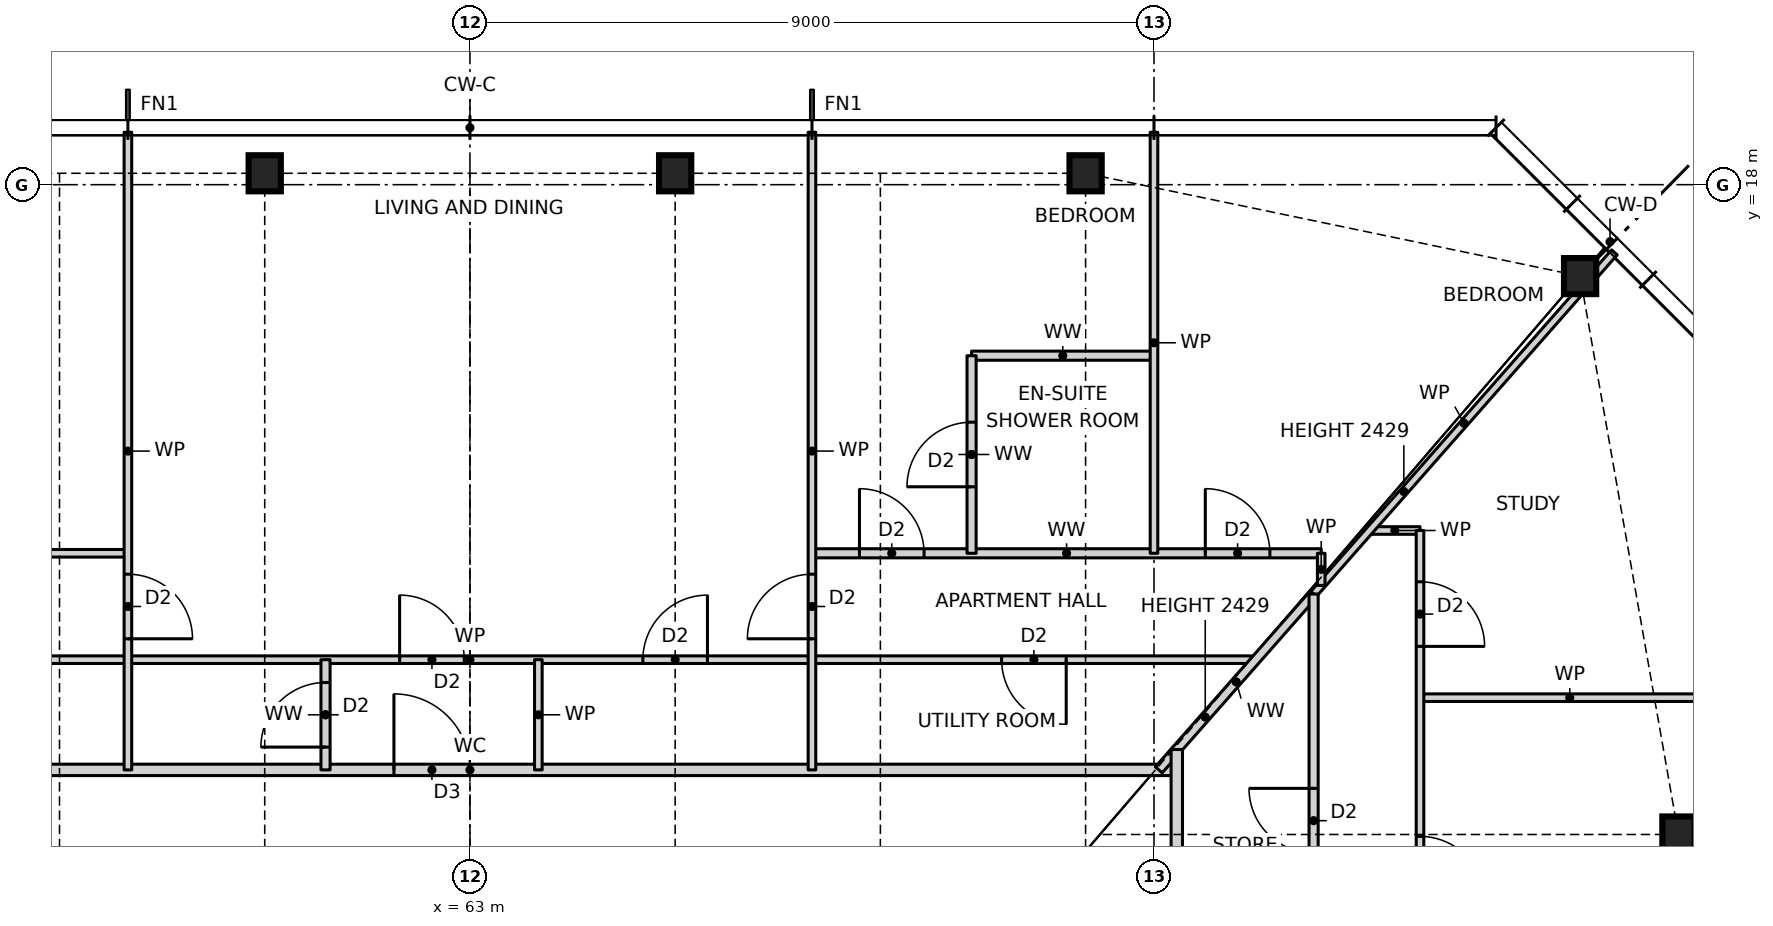
"""IFC4 building model, lengths in metres.
Left out: names, types, materials, properties, quantities, classifications, styles, units other than length and angle.
Written with IfcOpenShell. Run it as: python <this file> out.ifc"""

import sys

from ifc_helpers import new_model, si_unit, direction, frame, frame_2d, origin, origin_2d, place, context, subcontext, project, spatial, rectangle, i_section, extrude, element, fill, save


model = new_model("IFC4")
c1 = context("Model", 3, precision=1e-05, world=origin(), true_north=direction((0.0, 1.0)))
c2 = subcontext(c1, "Body", "Model", "MODEL_VIEW")
j1 = project(units=[si_unit("LENGTHUNIT", "METRE"), si_unit("PLANEANGLEUNIT", "RADIAN")], contexts=[c1])
p1 = place(None, origin())
s1 = spatial("IfcSite", under=j1, at=p1, CompositionType="ELEMENT")
p2 = place(p1, origin())
s2 = spatial("IfcBuilding", under=s1, at=p2, CompositionType="ELEMENT")
p3 = place(p2, frame((0.0, 0.0, 32.5)))
s3 = spatial("IfcBuildingStorey", under=s2, at=p3, CompositionType="ELEMENT", Elevation=32.5)
for number, where, z_axis, x_axis in (
    (1, (78.9, 9.45, 0.0), (0.0, 0.0, 1.0), (1.0, 0.0, 0.0)),
    (2, (77.606, 16.797, 0.0), (0.0, 0.0, 1.0), (1.0, 0.0, 0.0)),
    (3, (71.1, 18.15, 0.0), (0.0, 0.0, 1.0), (1.0, 0.0, 0.0)),
    (4, (65.7, 18.15, 0.0), (0.0, 0.0, 1.0), (1.0, 0.0, 0.0)),
    (5, (60.3, 18.15, 0.0), (0.0, 0.0, 1.0), (1.0, 0.0, 0.0)),
):
    element("IfcColumn", number, at=place(p3, frame(where, z_axis=z_axis, x_axis=x_axis)), inside=s3, PredefinedType="COLUMN", context=c2, shape_type="SweptSolid", body=[
        extrude(i_section(OverallWidth=0.424, OverallDepth=0.475, WebThickness=0.048, FlangeThickness=0.077, at=origin_2d()), origin(), (0.0, 0.0, 1.0), 3.5),
    ])
p4 = place(p3, frame((53.7, 10.3, 0.0), z_axis=(0.0, 0.0, 1.0), x_axis=(1.0, 0.0, 0.0)))
e6 = element("IfcWall", 6, at=p4, inside=s3, PredefinedType="PARTITIONING", context=c2, shape_type="SweptSolid", body=[
    extrude(rectangle(XDim=18.6, YDim=0.15, at=frame_2d((9.3, 0.0))), origin(), (0.0, 0.0, 1.0), 3.27),
])
p5 = place(p4, frame((8.3, 0.0, 0.0)))
e7 = element("IfcOpeningElement", 7, at=p5, cuts=e6, PredefinedType="OPENING", context=c2, shape_type="SweptSolid", body=[
    extrude(rectangle(XDim=1.0, YDim=2.1, at=frame_2d((0.5, 1.05))), frame((0.0, 0.085, 0.0), z_axis=(0.0, -1.0, 0.0), x_axis=(1.0, 0.0, 0.0)), (0.0, 0.0, 1.0), 0.17),
])
p6 = place(p3, frame((75.5, 11.25, 0.0), z_axis=(0.0, 0.0, 1.0), x_axis=(1.0, 0.0, 0.0)))
e8 = element("IfcWall", 8, at=p6, inside=s3, PredefinedType="PARTITIONING", context=c2, shape_type="SweptSolid", body=[
    extrude(rectangle(XDim=3.94, YDim=0.1, at=frame_2d((1.97, 0.0))), origin(), (0.0, 0.0, 1.0), 3.27),
])
p7 = place(p3, frame((52.66, 11.75, 0.0), z_axis=(0.0, 0.0, 1.0), x_axis=(1.0, 0.0, 0.0)))
e9 = element("IfcWall", 9, at=p7, inside=s3, PredefinedType="PARTITIONING", context=c2, shape_type="SweptSolid", body=[
    extrude(rectangle(XDim=20.68, YDim=0.1, at=frame_2d((10.34, 0.0))), origin(), (0.0, 0.0, 1.0), 3.27),
])
p8 = place(p7, frame((12.615, 0.0, 0.0)))
e10 = element("IfcOpeningElement", 10, at=p8, cuts=e9, PredefinedType="OPENING", context=c2, shape_type="SweptSolid", body=[
    extrude(rectangle(XDim=0.85, YDim=2.1, at=frame_2d((0.425, 1.05))), frame((0.0, 0.06, 0.0), z_axis=(0.0, -1.0, 0.0), x_axis=(1.0, 0.0, 0.0)), (0.0, 0.0, 1.0), 0.12),
])
p9 = place(p7, frame((9.415, 0.0, 0.0)))
e11 = element("IfcOpeningElement", 11, at=p9, cuts=e9, PredefinedType="OPENING", context=c2, shape_type="SweptSolid", body=[
    extrude(rectangle(XDim=0.85, YDim=2.1, at=frame_2d((0.425, 1.05))), frame((0.0, 0.06, 0.0), z_axis=(0.0, -1.0, 0.0), x_axis=(1.0, 0.0, 0.0)), (0.0, 0.0, 1.0), 0.12),
])
p10 = place(p7, frame((17.335, 0.0, 0.0)))
e12 = element("IfcOpeningElement", 12, at=p10, cuts=e9, PredefinedType="OPENING", context=c2, shape_type="SweptSolid", body=[
    extrude(rectangle(XDim=0.85, YDim=2.1, at=frame_2d((0.425, 1.05))), frame((0.0, 0.06, 0.0), z_axis=(0.0, -1.0, 0.0), x_axis=(1.0, 0.0, 0.0)), (0.0, 0.0, 1.0), 0.12),
])
p11 = place(p7, frame((2.495, 0.0, 0.0)))
e13 = element("IfcOpeningElement", 13, at=p11, cuts=e9, PredefinedType="OPENING", context=c2, shape_type="SweptSolid", body=[
    extrude(rectangle(XDim=0.85, YDim=2.1, at=frame_2d((0.425, 1.05))), frame((0.0, 0.06, 0.0), z_axis=(0.0, -1.0, 0.0), x_axis=(1.0, 0.0, 0.0)), (0.0, 0.0, 1.0), 0.12),
])
p12 = place(p3, frame((51.8, 13.15, 0.0), z_axis=(0.0, 0.0, 1.0), x_axis=(1.0, 0.0, 0.0)))
e14 = element("IfcWall", 14, at=p12, inside=s3, PredefinedType="PARTITIONING", context=c2, shape_type="SweptSolid", body=[
    extrude(rectangle(XDim=6.7, YDim=0.1, at=frame_2d((3.35, 0.0))), origin(), (0.0, 0.0, 1.0), 3.27),
])
p13 = place(p12, frame((4.025, 0.0, 0.0)))
e15 = element("IfcOpeningElement", 15, at=p13, cuts=e14, PredefinedType="OPENING", context=c2, shape_type="SweptSolid", body=[
    extrude(rectangle(XDim=0.85, YDim=2.1, at=frame_2d((0.425, 1.05))), frame((0.0, 0.06, 0.0), z_axis=(0.0, -1.0, 0.0), x_axis=(1.0, 0.0, 0.0)), (0.0, 0.0, 1.0), 0.12),
])
p14 = place(p12, frame((0.675, 0.0, 0.0)))
e16 = element("IfcOpeningElement", 16, at=p14, cuts=e14, PredefinedType="OPENING", context=c2, shape_type="SweptSolid", body=[
    extrude(rectangle(XDim=0.85, YDim=2.1, at=frame_2d((0.425, 1.05))), frame((0.0, 0.06, 0.0), z_axis=(0.0, -1.0, 0.0), x_axis=(1.0, 0.0, 0.0)), (0.0, 0.0, 1.0), 0.12),
])
p15 = place(p3, frame((67.5, 13.15, 0.0), z_axis=(0.0, 0.0, 1.0), x_axis=(1.0, 0.0, 0.0)))
e17 = element("IfcWall", 17, at=p15, inside=s3, PredefinedType="PARTITIONING", context=c2, shape_type="SweptSolid", body=[
    extrude(rectangle(XDim=6.7, YDim=0.12, at=frame_2d((3.35, 0.0))), origin(), (0.0, 0.0, 1.0), 3.27),
])
p16 = place(p15, frame((0.625, 0.0, 0.0)))
e18 = element("IfcOpeningElement", 18, at=p16, cuts=e17, PredefinedType="OPENING", context=c2, shape_type="SweptSolid", body=[
    extrude(rectangle(XDim=0.85, YDim=2.1, at=frame_2d((0.425, 1.05))), frame((0.0, 0.07, 0.0), z_axis=(0.0, -1.0, 0.0), x_axis=(1.0, 0.0, 0.0)), (0.0, 0.0, 1.0), 0.14),
])
p17 = place(p15, frame((5.175, 0.0, 0.0)))
e19 = element("IfcOpeningElement", 19, at=p17, cuts=e17, PredefinedType="OPENING", context=c2, shape_type="SweptSolid", body=[
    extrude(rectangle(XDim=0.85, YDim=2.1, at=frame_2d((0.425, 1.05))), frame((0.0, 0.07, 0.0), z_axis=(0.0, -1.0, 0.0), x_axis=(1.0, 0.0, 0.0)), (0.0, 0.0, 1.0), 0.14),
])
p18 = place(p3, frame((74.836, 13.45, 0.0), z_axis=(0.0, 0.0, 1.0), x_axis=(1.0, 0.0, 0.0)))
e20 = element("IfcWall", 20, at=p18, inside=s3, PredefinedType="PARTITIONING", context=c2, shape_type="SweptSolid", body=[
    extrude(rectangle(XDim=0.664, YDim=0.1, at=frame_2d((0.332, 0.0))), origin(), (0.0, 0.0, 1.0), 3.27),
])
p19 = place(p3, frame((69.6, 15.75, 0.0), z_axis=(0.0, 0.0, 1.0), x_axis=(1.0, 0.0, 0.0)))
e21 = element("IfcWall", 21, at=p19, inside=s3, PredefinedType="PARTITIONING", context=c2, shape_type="SweptSolid", body=[
    extrude(rectangle(XDim=2.4, YDim=0.12, at=frame_2d((1.2, 0.0))), origin(), (0.0, 0.0, 1.0), 3.27),
])
p20 = place(p3, frame((74.1, 12.614, 0.0), z_axis=(0.0, 0.0, 1.0), x_axis=(0.660755619739, 0.750601099775, 0.0)))
e22 = element("IfcWall", 22, at=p20, inside=s3, PredefinedType="PARTITIONING", context=c2, shape_type="SweptSolid", body=[
    extrude(rectangle(XDim=5.989, YDim=0.1, at=frame_2d((2.995, 0.0))), origin(), (0.0, 0.0, 1.0), 2.429),
])
p21 = place(p3, frame((72.063, 10.301, 0.0), z_axis=(0.0, 0.0, 1.0), x_axis=(0.660761820138, 0.750595641506, 0.0)))
e23 = element("IfcWall", 23, at=p21, inside=s3, PredefinedType="PARTITIONING", context=c2, shape_type="SweptSolid", body=[
    extrude(rectangle(XDim=3.082, YDim=0.12, at=frame_2d((1.541, 0.0))), origin(), (0.0, 0.0, 1.0), 2.429),
])
p22 = place(p3, frame((75.5, 2.25, 0.0), z_axis=(0.0, 0.0, 1.0), x_axis=(0.0, 1.0, 0.0)))
e24 = element("IfcWall", 24, at=p22, inside=s3, PredefinedType="PARTITIONING", context=c2, shape_type="SweptSolid", body=[
    extrude(rectangle(XDim=11.2, YDim=0.1, at=frame_2d((5.6, 0.0))), origin(), (0.0, 0.0, 1.0), 3.27),
])
p23 = place(p22, frame((1.825, 0.0, 0.0)))
e25 = element("IfcOpeningElement", 25, at=p23, cuts=e24, PredefinedType="OPENING", context=c2, shape_type="SweptSolid", body=[
    extrude(rectangle(XDim=0.85, YDim=2.1, at=frame_2d((0.425, 1.05))), frame((0.0, 0.06, 0.0), z_axis=(0.0, -1.0, 0.0), x_axis=(1.0, 0.0, 0.0)), (0.0, 0.0, 1.0), 0.12),
])
p24 = place(p22, frame((6.325, 0.0, 0.0)))
e26 = element("IfcOpeningElement", 26, at=p24, cuts=e24, PredefinedType="OPENING", context=c2, shape_type="SweptSolid", body=[
    extrude(rectangle(XDim=0.85, YDim=2.1, at=frame_2d((0.425, 1.05))), frame((0.0, 0.06, 0.0), z_axis=(0.0, -1.0, 0.0), x_axis=(1.0, 0.0, 0.0)), (0.0, 0.0, 1.0), 0.12),
])
p25 = place(p22, frame((9.675, 0.0, 0.0)))
e27 = element("IfcOpeningElement", 27, at=p25, cuts=e24, PredefinedType="OPENING", context=c2, shape_type="SweptSolid", body=[
    extrude(rectangle(XDim=0.85, YDim=2.1, at=frame_2d((0.425, 1.05))), frame((0.0, 0.06, 0.0), z_axis=(0.0, -1.0, 0.0), x_axis=(1.0, 0.0, 0.0)), (0.0, 0.0, 1.0), 0.12),
])
p26 = place(p3, frame((74.2, 12.727, 0.0), z_axis=(0.0, 0.0, 1.0), x_axis=(0.0, 1.0, 0.0)))
e28 = element("IfcWall", 28, at=p26, inside=s3, PredefinedType="PARTITIONING", context=c2, shape_type="SweptSolid", body=[
    extrude(rectangle(XDim=0.423, YDim=0.1, at=frame_2d((0.211, 0.0))), origin(), (0.0, 0.0, 1.0), 3.27),
])
p27 = place(p3, frame((74.1, -12.614, 0.0), z_axis=(0.0, 0.0, 1.0), x_axis=(0.0, 1.0, 0.0)))
e29 = element("IfcWall", 29, at=p27, inside=s3, PredefinedType="PARTITIONING", context=c2, shape_type="SweptSolid", body=[
    extrude(rectangle(XDim=25.228, YDim=0.12, at=frame_2d((12.614, 0.0))), origin(), (0.0, 0.0, 1.0), 3.27),
])
p28 = place(p27, frame((7.239, 0.0, 0.0)))
e30 = element("IfcOpeningElement", 30, at=p28, cuts=e29, PredefinedType="OPENING", context=c2, shape_type="SweptSolid", body=[
    extrude(rectangle(XDim=0.85, YDim=2.1, at=frame_2d((0.425, 1.05))), frame((0.0, 0.07, 0.0), z_axis=(0.0, -1.0, 0.0), x_axis=(1.0, 0.0, 0.0)), (0.0, 0.0, 1.0), 0.14),
])
p29 = place(p27, frame((10.439, 0.0, 0.0)))
e31 = element("IfcOpeningElement", 31, at=p29, cuts=e29, PredefinedType="OPENING", context=c2, shape_type="SweptSolid", body=[
    extrude(rectangle(XDim=0.85, YDim=2.1, at=frame_2d((0.425, 1.05))), frame((0.0, 0.07, 0.0), z_axis=(0.0, -1.0, 0.0), x_axis=(1.0, 0.0, 0.0)), (0.0, 0.0, 1.0), 0.14),
])
p30 = place(p27, frame((2.507, 0.0, 0.0)))
e32 = element("IfcOpeningElement", 32, at=p30, cuts=e29, PredefinedType="OPENING", context=c2, shape_type="SweptSolid", body=[
    extrude(rectangle(XDim=0.85, YDim=2.1, at=frame_2d((0.425, 1.05))), frame((0.0, 0.07, 0.0), z_axis=(0.0, -1.0, 0.0), x_axis=(1.0, 0.0, 0.0)), (0.0, 0.0, 1.0), 0.14),
])
p31 = place(p27, frame((16.639, 0.0, 0.0)))
e33 = element("IfcOpeningElement", 33, at=p31, cuts=e29, PredefinedType="OPENING", context=c2, shape_type="SweptSolid", body=[
    extrude(rectangle(XDim=0.85, YDim=2.1, at=frame_2d((0.425, 1.05))), frame((0.0, 0.07, 0.0), z_axis=(0.0, -1.0, 0.0), x_axis=(1.0, 0.0, 0.0)), (0.0, 0.0, 1.0), 0.14),
])
p32 = place(p27, frame((21.821, 0.0, 0.0)))
e34 = element("IfcOpeningElement", 34, at=p32, cuts=e29, PredefinedType="OPENING", context=c2, shape_type="SweptSolid", body=[
    extrude(rectangle(XDim=0.85, YDim=2.1, at=frame_2d((0.425, 1.05))), frame((0.0, 0.07, 0.0), z_axis=(0.0, -1.0, 0.0), x_axis=(1.0, 0.0, 0.0)), (0.0, 0.0, 1.0), 0.14),
])
p33 = place(p3, frame((72.3, -10.568, 0.0), z_axis=(0.0, 0.0, 1.0), x_axis=(0.0, 1.0, 0.0)))
e35 = element("IfcWall", 35, at=p33, inside=s3, PredefinedType="PARTITIONING", context=c2, shape_type="SweptSolid", body=[
    extrude(rectangle(XDim=21.136, YDim=0.15, at=frame_2d((10.568, 0.0))), origin(), (0.0, 0.0, 1.0), 3.27),
])
p34 = place(p33, frame((8.318, 0.0, 0.0)))
e36 = element("IfcOpeningElement", 36, at=p34, cuts=e35, PredefinedType="OPENING", context=c2, shape_type="SweptSolid", body=[
    extrude(rectangle(XDim=1.0, YDim=2.1, at=frame_2d((0.5, 1.05))), frame((0.0, 0.085, 0.0), z_axis=(0.0, -1.0, 0.0), x_axis=(1.0, 0.0, 0.0)), (0.0, 0.0, 1.0), 0.17),
])
p35 = place(p3, frame((72.0, 13.15, 0.0), z_axis=(0.0, 0.0, 1.0), x_axis=(0.0, 1.0, 0.0)))
e37 = element("IfcWall", 37, at=p35, inside=s3, PredefinedType="PARTITIONING", context=c2, shape_type="SweptSolid", body=[
    extrude(rectangle(XDim=5.54, YDim=0.1, at=frame_2d((2.77, 0.0))), origin(), (0.0, 0.0, 1.0), 3.27),
])
p36 = place(p3, frame((69.6, 13.15, 0.0), z_axis=(0.0, 0.0, 1.0), x_axis=(0.0, 1.0, 0.0)))
e38 = element("IfcWall", 38, at=p36, inside=s3, PredefinedType="PARTITIONING", context=c2, shape_type="SweptSolid", body=[
    extrude(rectangle(XDim=2.6, YDim=0.12, at=frame_2d((1.3, 0.0))), origin(), (0.0, 0.0, 1.0), 3.27),
])
p37 = place(p36, frame((0.875, 0.0, 0.0)))
e39 = element("IfcOpeningElement", 39, at=p37, cuts=e38, PredefinedType="OPENING", context=c2, shape_type="SweptSolid", body=[
    extrude(rectangle(XDim=0.85, YDim=2.1, at=frame_2d((0.425, 1.05))), frame((0.0, 0.07, 0.0), z_axis=(0.0, -1.0, 0.0), x_axis=(1.0, 0.0, 0.0)), (0.0, 0.0, 1.0), 0.14),
])
p38 = place(p3, frame((67.5, 10.3, 0.0), z_axis=(0.0, 0.0, 1.0), x_axis=(0.0, 1.0, 0.0)))
e40 = element("IfcWall", 40, at=p38, inside=s3, PredefinedType="PARTITIONING", context=c2, shape_type="SweptSolid", body=[
    extrude(rectangle(XDim=8.39, YDim=0.1, at=frame_2d((4.195, 0.0))), origin(), (0.0, 0.0, 1.0), 3.27),
])
p39 = place(p38, frame((1.725, 0.0, 0.0)))
e41 = element("IfcOpeningElement", 41, at=p39, cuts=e40, PredefinedType="OPENING", context=c2, shape_type="SweptSolid", body=[
    extrude(rectangle(XDim=0.85, YDim=2.1, at=frame_2d((0.425, 1.05))), frame((0.0, 0.06, 0.0), z_axis=(0.0, -1.0, 0.0), x_axis=(1.0, 0.0, 0.0)), (0.0, 0.0, 1.0), 0.12),
])
p40 = place(p3, frame((63.9, 10.3, 0.0), z_axis=(0.0, 0.0, 1.0), x_axis=(0.0, 1.0, 0.0)))
e42 = element("IfcWall", 42, at=p40, inside=s3, PredefinedType="PARTITIONING", context=c2, shape_type="SweptSolid", body=[
    extrude(rectangle(XDim=1.45, YDim=0.1, at=frame_2d((0.725, 0.0))), origin(), (0.0, 0.0, 1.0), 3.27),
])
p41 = place(p3, frame((61.1, 10.3, 0.0), z_axis=(0.0, 0.0, 1.0), x_axis=(0.0, 1.0, 0.0)))
e43 = element("IfcWall", 43, at=p41, inside=s3, PredefinedType="PARTITIONING", context=c2, shape_type="SweptSolid", body=[
    extrude(rectangle(XDim=1.45, YDim=0.12, at=frame_2d((0.725, 0.0))), origin(), (0.0, 0.0, 1.0), 3.27),
])
p42 = place(p41, frame((0.3, 0.0, 0.0)))
e44 = element("IfcOpeningElement", 44, at=p42, cuts=e43, PredefinedType="OPENING", context=c2, shape_type="SweptSolid", body=[
    extrude(rectangle(XDim=0.85, YDim=2.1, at=frame_2d((0.425, 1.05))), frame((0.0, 0.07, 0.0), z_axis=(0.0, -1.0, 0.0), x_axis=(1.0, 0.0, 0.0)), (0.0, 0.0, 1.0), 0.14),
])
p43 = place(p3, frame((58.5, 10.3, 0.0), z_axis=(0.0, 0.0, 1.0), x_axis=(0.0, 1.0, 0.0)))
e45 = element("IfcWall", 45, at=p43, inside=s3, PredefinedType="PARTITIONING", context=c2, shape_type="SweptSolid", body=[
    extrude(rectangle(XDim=8.39, YDim=0.1, at=frame_2d((4.195, 0.0))), origin(), (0.0, 0.0, 1.0), 3.27),
])
p44 = place(p43, frame((1.725, 0.0, 0.0)))
e46 = element("IfcOpeningElement", 46, at=p44, cuts=e45, PredefinedType="OPENING", context=c2, shape_type="SweptSolid", body=[
    extrude(rectangle(XDim=0.85, YDim=2.1, at=frame_2d((0.425, 1.05))), frame((0.0, 0.06, 0.0), z_axis=(0.0, -1.0, 0.0), x_axis=(1.0, 0.0, 0.0)), (0.0, 0.0, 1.0), 0.12),
])
p45 = place(p24, frame((0.85, 0.0, 0.0), z_axis=(0.0, 0.0, 1.0), x_axis=(-1.0, 0.0, 0.0)))
e47 = element("IfcDoor", 47, at=p45, inside=s3, OperationType="SINGLE_SWING_RIGHT", PredefinedType="DOOR", context=c2, shape_type="SweptSolid", body=[
    extrude(rectangle(XDim=0.85, YDim=2.1, at=frame_2d((0.425, 1.05))), frame((0.0, 0.025, 0.0), z_axis=(0.0, -1.0, 0.0), x_axis=(1.0, 0.0, 0.0)), (0.0, 0.0, 1.0), 0.05),
])
fill(e26, e47)
p46 = place(p25, frame((0.85, 0.0, 0.0), z_axis=(0.0, 0.0, 1.0), x_axis=(-1.0, 0.0, 0.0)))
e48 = element("IfcDoor", 48, at=p46, inside=s3, OperationType="SINGLE_SWING_RIGHT", PredefinedType="DOOR", context=c2, shape_type="SweptSolid", body=[
    extrude(rectangle(XDim=0.85, YDim=2.1, at=frame_2d((0.425, 1.05))), frame((0.0, 0.025, 0.0), z_axis=(0.0, -1.0, 0.0), x_axis=(1.0, 0.0, 0.0)), (0.0, 0.0, 1.0), 0.05),
])
fill(e27, e48)
p47 = place(p32, origin())
e49 = element("IfcDoor", 49, at=p47, inside=s3, OperationType="SINGLE_SWING_RIGHT", PredefinedType="DOOR", context=c2, shape_type="SweptSolid", body=[
    extrude(rectangle(XDim=0.85, YDim=2.1, at=frame_2d((0.425, 1.05))), frame((0.0, 0.025, 0.0), z_axis=(0.0, -1.0, 0.0), x_axis=(1.0, 0.0, 0.0)), (0.0, 0.0, 1.0), 0.05),
])
fill(e34, e49)
p48 = place(p8, origin())
e50 = element("IfcDoor", 50, at=p48, inside=s3, OperationType="SINGLE_SWING_RIGHT", PredefinedType="DOOR", context=c2, shape_type="SweptSolid", body=[
    extrude(rectangle(XDim=0.85, YDim=2.1, at=frame_2d((0.425, 1.05))), frame((0.0, 0.025, 0.0), z_axis=(0.0, -1.0, 0.0), x_axis=(1.0, 0.0, 0.0)), (0.0, 0.0, 1.0), 0.05),
])
fill(e10, e50)
p49 = place(p5, origin())
e51 = element("IfcDoor", 51, at=p49, inside=s3, OperationType="SINGLE_SWING_LEFT", PredefinedType="DOOR", context=c2, shape_type="SweptSolid", body=[
    extrude(rectangle(XDim=1.0, YDim=2.1, at=frame_2d((0.5, 1.05))), frame((0.0, 0.025, 0.0), z_axis=(0.0, -1.0, 0.0), x_axis=(1.0, 0.0, 0.0)), (0.0, 0.0, 1.0), 0.05),
])
fill(e7, e51)
p50 = place(p9, origin())
e52 = element("IfcDoor", 52, at=p50, inside=s3, OperationType="SINGLE_SWING_LEFT", PredefinedType="DOOR", context=c2, shape_type="SweptSolid", body=[
    extrude(rectangle(XDim=0.85, YDim=2.1, at=frame_2d((0.425, 1.05))), frame((0.0, 0.025, 0.0), z_axis=(0.0, -1.0, 0.0), x_axis=(1.0, 0.0, 0.0)), (0.0, 0.0, 1.0), 0.05),
])
fill(e11, e52)
p51 = place(p42, origin())
e53 = element("IfcDoor", 53, at=p51, inside=s3, OperationType="SINGLE_SWING_LEFT", PredefinedType="DOOR", context=c2, shape_type="SweptSolid", body=[
    extrude(rectangle(XDim=0.85, YDim=2.1, at=frame_2d((0.425, 1.05))), frame((0.0, 0.025, 0.0), z_axis=(0.0, -1.0, 0.0), x_axis=(1.0, 0.0, 0.0)), (0.0, 0.0, 1.0), 0.05),
])
fill(e44, e53)
p52 = place(p39, origin())
e54 = element("IfcDoor", 54, at=p52, inside=s3, OperationType="SINGLE_SWING_LEFT", PredefinedType="DOOR", context=c2, shape_type="SweptSolid", body=[
    extrude(rectangle(XDim=0.85, YDim=2.1, at=frame_2d((0.425, 1.05))), frame((0.0, 0.025, 0.0), z_axis=(0.0, -1.0, 0.0), x_axis=(1.0, 0.0, 0.0)), (0.0, 0.0, 1.0), 0.05),
])
fill(e41, e54)
p53 = place(p37, origin())
e55 = element("IfcDoor", 55, at=p53, inside=s3, OperationType="SINGLE_SWING_LEFT", PredefinedType="DOOR", context=c2, shape_type="SweptSolid", body=[
    extrude(rectangle(XDim=0.85, YDim=2.1, at=frame_2d((0.425, 1.05))), frame((0.0, 0.025, 0.0), z_axis=(0.0, -1.0, 0.0), x_axis=(1.0, 0.0, 0.0)), (0.0, 0.0, 1.0), 0.05),
])
fill(e39, e55)
p54 = place(p16, origin())
e56 = element("IfcDoor", 56, at=p54, inside=s3, OperationType="SINGLE_SWING_LEFT", PredefinedType="DOOR", context=c2, shape_type="SweptSolid", body=[
    extrude(rectangle(XDim=0.85, YDim=2.1, at=frame_2d((0.425, 1.05))), frame((0.0, 0.025, 0.0), z_axis=(0.0, -1.0, 0.0), x_axis=(1.0, 0.0, 0.0)), (0.0, 0.0, 1.0), 0.05),
])
fill(e18, e56)
p55 = place(p17, origin())
e57 = element("IfcDoor", 57, at=p55, inside=s3, OperationType="SINGLE_SWING_LEFT", PredefinedType="DOOR", context=c2, shape_type="SweptSolid", body=[
    extrude(rectangle(XDim=0.85, YDim=2.1, at=frame_2d((0.425, 1.05))), frame((0.0, 0.025, 0.0), z_axis=(0.0, -1.0, 0.0), x_axis=(1.0, 0.0, 0.0)), (0.0, 0.0, 1.0), 0.05),
])
fill(e19, e57)
p56 = place(p10, frame((0.85, 0.0, 0.0), z_axis=(0.0, 0.0, 1.0), x_axis=(-1.0, 0.0, 0.0)))
e58 = element("IfcDoor", 58, at=p56, inside=s3, OperationType="SINGLE_SWING_LEFT", PredefinedType="DOOR", context=c2, shape_type="SweptSolid", body=[
    extrude(rectangle(XDim=0.85, YDim=2.1, at=frame_2d((0.425, 1.05))), frame((0.0, 0.025, 0.0), z_axis=(0.0, -1.0, 0.0), x_axis=(1.0, 0.0, 0.0)), (0.0, 0.0, 1.0), 0.05),
])
fill(e12, e58)
p57 = place(p44, frame((0.85, 0.0, 0.0), z_axis=(0.0, 0.0, 1.0), x_axis=(-1.0, 0.0, 0.0)))
e59 = element("IfcDoor", 59, at=p57, inside=s3, OperationType="SINGLE_SWING_RIGHT", PredefinedType="DOOR", context=c2, shape_type="SweptSolid", body=[
    extrude(rectangle(XDim=0.85, YDim=2.1, at=frame_2d((0.425, 1.05))), frame((0.0, 0.025, 0.0), z_axis=(0.0, -1.0, 0.0), x_axis=(1.0, 0.0, 0.0)), (0.0, 0.0, 1.0), 0.05),
])
fill(e46, e59)
save(model, sys.argv[1])
